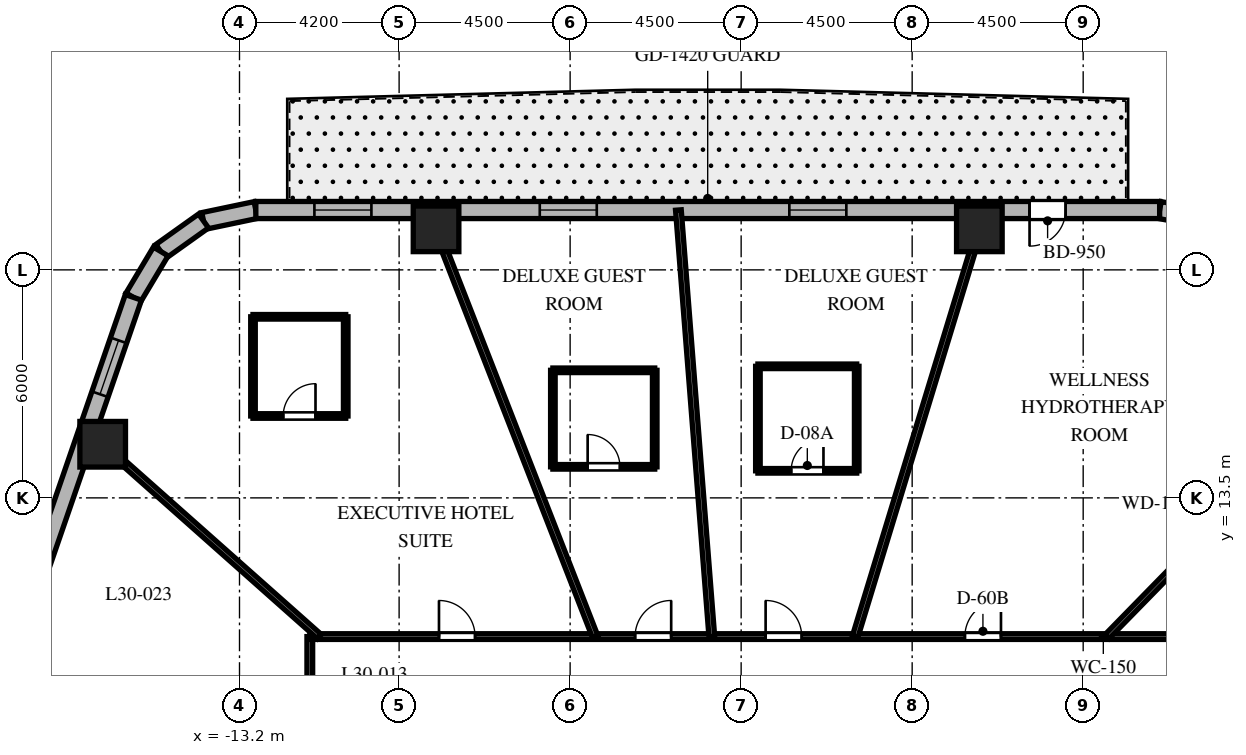
"""IFC4 building model, lengths in metres.
Left out: names, types, materials, properties, quantities, classifications, styles, units other than length and angle.
Written with IfcOpenShell. Run it as: python <this file> out.ifc"""

import sys

from ifc_helpers import new_model, si_unit, direction, frame, frame_2d, origin, origin_2d, place, context, subcontext, project, spatial, rectangle, extrude, element, fill, save


model = new_model("IFC4")
c1 = context("Model", 3, precision=1e-05, world=origin(), true_north=direction((0.0, 1.0)))
c2 = subcontext(c1, "Body", "Model", "MODEL_VIEW")
j1 = project(units=[si_unit("LENGTHUNIT", "METRE"), si_unit("PLANEANGLEUNIT", "RADIAN")], contexts=[c1])
p1 = place(None, origin())
s1 = spatial("IfcSite", under=j1, at=p1, CompositionType="ELEMENT")
p2 = place(p1, origin())
s2 = spatial("IfcBuilding", under=s1, at=p2, CompositionType="ELEMENT")
p3 = place(p2, frame((0.0, 0.0, 124.7)))
s3 = spatial("IfcBuildingStorey", under=s2, at=p3, CompositionType="ELEMENT", Elevation=124.7)
for number, where, z_axis, x_axis in (
    (1, (6.268, 20.58, 0.0), (0.0, 0.0, 1.0), (1.0, 0.0, 0.0)),
    (2, (-8.028, 20.58, 0.0), (0.0, 0.0, 1.0), (1.0, 0.0, 0.0)),
    (3, (-16.8, 14.911, 0.0), (0.0, 0.0, 1.0), (1.0, 0.0, 0.0)),
):
    element("IfcColumn", number, at=place(p3, frame(where, z_axis=z_axis, x_axis=x_axis)), inside=s3, PredefinedType="COLUMN", context=c2, shape_type="SweptSolid", body=[
        extrude(rectangle(XDim=1.2, YDim=1.2, at=origin_2d()), origin(), (0.0, 0.0, 1.0), 3.7),
    ])
p4 = place(p3, frame((12.259, 20.84, 0.0), z_axis=(0.0, 0.0, 1.0), x_axis=(-0.982730354425, 0.185043374624, 0.0)))
e4 = element("IfcWall", 4, at=p4, inside=s3, PredefinedType="SOLIDWALL", context=c2, shape_type="SweptSolid", body=[
    extrude(rectangle(XDim=1.269, YDim=0.45, at=frame_2d((0.635, 0.0))), origin(), (0.0, 0.0, 1.0), 3.4),
])
p5 = place(p3, frame((-12.771, 21.075, 0.0), z_axis=(0.0, 0.0, 1.0), x_axis=(-0.97874281988, -0.205091424819, 0.0)))
e5 = element("IfcWall", 5, at=p5, inside=s3, PredefinedType="SOLIDWALL", context=c2, shape_type="SweptSolid", body=[
    extrude(rectangle(XDim=1.406, YDim=0.45, at=frame_2d((0.703, 0.0))), origin(), (0.0, 0.0, 1.0), 3.4),
])
p6 = place(p3, frame((-14.146, 20.787, 0.0), z_axis=(0.0, 0.0, 1.0), x_axis=(-0.814162929117, -0.580636482536, 0.0)))
e6 = element("IfcWall", 6, at=p6, inside=s3, PredefinedType="SOLIDWALL", context=c2, shape_type="SweptSolid", body=[
    extrude(rectangle(XDim=1.382, YDim=0.45, at=frame_2d((0.691, 0.0))), origin(), (0.0, 0.0, 1.0), 3.4),
])
p7 = place(p3, frame((-15.272, 19.984, 0.0), z_axis=(0.0, 0.0, 1.0), x_axis=(-0.512579347361, -0.858639862025, 0.0)))
e7 = element("IfcWall", 7, at=p7, inside=s3, PredefinedType="SOLIDWALL", context=c2, shape_type="SweptSolid", body=[
    extrude(rectangle(XDim=1.406, YDim=0.45, at=frame_2d((0.703, 0.0))), origin(), (0.0, 0.0, 1.0), 3.4),
])
p8 = place(p3, frame((11.012, 21.075, 0.0), z_axis=(0.0, 0.0, 1.0), x_axis=(-1.0, 0.0, 0.0)))
e8 = element("IfcWall", 8, at=p8, inside=s3, PredefinedType="SOLIDWALL", context=c2, shape_type="SweptSolid", body=[
    extrude(rectangle(XDim=23.782, YDim=0.45, at=frame_2d((11.891, 0.0))), origin(), (0.0, 0.0, 1.0), 3.4),
])
p9 = place(p8, frame((2.473, 0.0, 0.0)))
e9 = element("IfcOpeningElement", 9, at=p9, cuts=e8, PredefinedType="OPENING", context=c2, shape_type="SweptSolid", body=[
    extrude(rectangle(XDim=0.95, YDim=2.15, at=frame_2d((0.475, 1.075))), frame((0.0, 0.235, 0.0), z_axis=(0.0, -1.0, 0.0), x_axis=(1.0, 0.0, 0.0)), (0.0, 0.0, 1.0), 0.47),
])
p10 = place(p8, frame((8.244, 0.0, 0.8)))
e10 = element("IfcOpeningElement", 10, at=p10, cuts=e8, PredefinedType="OPENING", context=c2, shape_type="SweptSolid", body=[
    extrude(rectangle(XDim=1.5, YDim=1.8, at=frame_2d((0.75, 0.9))), frame((0.0, 0.235, 0.0), z_axis=(0.0, -1.0, 0.0), x_axis=(1.0, 0.0, 0.0)), (0.0, 0.0, 1.0), 0.47),
])
p11 = place(p8, frame((14.811, 0.0, 0.8)))
e11 = element("IfcOpeningElement", 11, at=p11, cuts=e8, PredefinedType="OPENING", context=c2, shape_type="SweptSolid", body=[
    extrude(rectangle(XDim=1.5, YDim=1.8, at=frame_2d((0.75, 0.9))), frame((0.0, 0.235, 0.0), z_axis=(0.0, -1.0, 0.0), x_axis=(1.0, 0.0, 0.0)), (0.0, 0.0, 1.0), 0.47),
])
p12 = place(p8, frame((20.741, 0.0, 0.8)))
e12 = element("IfcOpeningElement", 12, at=p12, cuts=e8, PredefinedType="OPENING", context=c2, shape_type="SweptSolid", body=[
    extrude(rectangle(XDim=1.5, YDim=1.8, at=frame_2d((0.75, 0.9))), frame((0.0, 0.235, 0.0), z_axis=(0.0, -1.0, 0.0), x_axis=(1.0, 0.0, 0.0)), (0.0, 0.0, 1.0), 0.47),
])
p13 = place(p3, frame((-15.992, 18.777, 0.0), z_axis=(0.0, 0.0, 1.0), x_axis=(-0.325606988926, -0.945505202927, 0.0)))
e13 = element("IfcWall", 13, at=p13, inside=s3, PredefinedType="SOLIDWALL", context=c2, shape_type="SweptSolid", body=[
    extrude(rectangle(XDim=19.669, YDim=0.45, at=frame_2d((9.835, 0.0))), origin(), (0.0, 0.0, 1.0), 3.4),
])
p14 = place(p13, frame((1.197, 0.0, 0.8)))
e14 = element("IfcOpeningElement", 14, at=p14, cuts=e13, PredefinedType="OPENING", context=c2, shape_type="SweptSolid", body=[
    extrude(rectangle(XDim=1.5, YDim=1.8, at=frame_2d((0.75, 0.9))), frame((0.0, 0.235, 0.0), z_axis=(0.0, -1.0, 0.0), x_axis=(1.0, 0.0, 0.0)), (0.0, 0.0, 1.0), 0.47),
])
p15 = place(p13, frame((9.03, 0.0, 0.8)))
e15 = element("IfcOpeningElement", 15, at=p15, cuts=e13, PredefinedType="OPENING", context=c2, shape_type="SweptSolid", body=[
    extrude(rectangle(XDim=1.5, YDim=1.8, at=frame_2d((0.75, 0.9))), frame((0.0, 0.235, 0.0), z_axis=(0.0, -1.0, 0.0), x_axis=(1.0, 0.0, 0.0)), (0.0, 0.0, 1.0), 0.47),
])
p16 = place(p13, frame((16.918, 0.0, 0.8)))
e16 = element("IfcOpeningElement", 16, at=p16, cuts=e13, PredefinedType="OPENING", context=c2, shape_type="SweptSolid", body=[
    extrude(rectangle(XDim=1.5, YDim=1.8, at=frame_2d((0.75, 0.9))), frame((0.0, 0.235, 0.0), z_axis=(0.0, -1.0, 0.0), x_axis=(1.0, 0.0, 0.0)), (0.0, 0.0, 1.0), 0.47),
])
p17 = place(p3, frame((-11.35, -9.85, 0.0), z_axis=(0.0, 0.0, 1.0), x_axis=(0.0, 1.0, 0.0)))
e17 = element("IfcWall", 17, at=p17, inside=s3, PredefinedType="PARTITIONING", context=c2, shape_type="SweptSolid", body=[
    extrude(rectangle(XDim=19.7, YDim=0.15, at=frame_2d((9.85, 0.0))), origin(), (0.0, 0.0, 1.0), 2.84),
])
p18 = place(p17, frame((15.205, 0.0, 0.0)))
e18 = element("IfcOpeningElement", 18, at=p18, cuts=e17, PredefinedType="OPENING", context=c2, shape_type="SweptSolid", body=[
    extrude(rectangle(XDim=0.95, YDim=2.03, at=frame_2d((0.475, 1.015))), frame((0.0, 0.085, 0.0), z_axis=(0.0, -1.0, 0.0), x_axis=(1.0, 0.0, 0.0)), (0.0, 0.0, 1.0), 0.17),
])
p19 = place(p17, frame((8.836, 0.0, 0.0)))
e19 = element("IfcOpeningElement", 19, at=p19, cuts=e17, PredefinedType="OPENING", context=c2, shape_type="SweptSolid", body=[
    extrude(rectangle(XDim=0.95, YDim=2.03, at=frame_2d((0.475, 1.015))), frame((0.0, 0.085, 0.0), z_axis=(0.0, -1.0, 0.0), x_axis=(1.0, 0.0, 0.0)), (0.0, 0.0, 1.0), 0.17),
])
p20 = place(p17, frame((3.008, 0.0, 0.0)))
e20 = element("IfcOpeningElement", 20, at=p20, cuts=e17, PredefinedType="OPENING", context=c2, shape_type="SweptSolid", body=[
    extrude(rectangle(XDim=0.95, YDim=2.03, at=frame_2d((0.475, 1.015))), frame((0.0, 0.085, 0.0), z_axis=(0.0, -1.0, 0.0), x_axis=(1.0, 0.0, 0.0)), (0.0, 0.0, 1.0), 0.17),
])
p21 = place(p3, frame((-11.35, 9.85, 0.0), z_axis=(0.0, 0.0, 1.0), x_axis=(1.0, 0.0, 0.0)))
e21 = element("IfcWall", 21, at=p21, inside=s3, PredefinedType="PARTITIONING", context=c2, shape_type="SweptSolid", body=[
    extrude(rectangle(XDim=22.7, YDim=0.15, at=frame_2d((11.35, 0.0))), origin(), (0.0, 0.0, 1.0), 2.84),
])
p22 = place(p21, frame((17.237, 0.0, 0.0)))
e22 = element("IfcOpeningElement", 22, at=p22, cuts=e21, PredefinedType="OPENING", context=c2, shape_type="SweptSolid", body=[
    extrude(rectangle(XDim=0.95, YDim=2.03, at=frame_2d((0.475, 1.015))), frame((0.0, 0.085, 0.0), z_axis=(0.0, -1.0, 0.0), x_axis=(1.0, 0.0, 0.0)), (0.0, 0.0, 1.0), 0.17),
])
p23 = place(p21, frame((11.994, 0.0, 0.0)))
e23 = element("IfcOpeningElement", 23, at=p23, cuts=e21, PredefinedType="OPENING", context=c2, shape_type="SweptSolid", body=[
    extrude(rectangle(XDim=0.95, YDim=2.03, at=frame_2d((0.475, 1.015))), frame((0.0, 0.085, 0.0), z_axis=(0.0, -1.0, 0.0), x_axis=(1.0, 0.0, 0.0)), (0.0, 0.0, 1.0), 0.17),
])
p24 = place(p21, frame((8.559, 0.0, 0.0)))
e24 = element("IfcOpeningElement", 24, at=p24, cuts=e21, PredefinedType="OPENING", context=c2, shape_type="SweptSolid", body=[
    extrude(rectangle(XDim=0.95, YDim=2.03, at=frame_2d((0.475, 1.015))), frame((0.0, 0.085, 0.0), z_axis=(0.0, -1.0, 0.0), x_axis=(1.0, 0.0, 0.0)), (0.0, 0.0, 1.0), 0.17),
])
p25 = place(p21, frame((3.399, 0.0, 0.0)))
e25 = element("IfcOpeningElement", 25, at=p25, cuts=e21, PredefinedType="OPENING", context=c2, shape_type="SweptSolid", body=[
    extrude(rectangle(XDim=0.95, YDim=2.03, at=frame_2d((0.475, 1.015))), frame((0.0, 0.085, 0.0), z_axis=(0.0, -1.0, 0.0), x_axis=(1.0, 0.0, 0.0)), (0.0, 0.0, 1.0), 0.17),
])
p26 = place(p3, frame((9.628, 9.85, 0.0), z_axis=(0.0, 0.0, 1.0), x_axis=(0.698992824326, 0.715128681805, 0.0)))
e26 = element("IfcWall", 26, at=p26, inside=s3, PredefinedType="PARTITIONING", context=c2, shape_type="SweptSolid", body=[
    extrude(rectangle(XDim=8.579, YDim=0.15, at=frame_2d((4.29, 0.0))), origin(), (0.0, 0.0, 1.0), 2.54),
])
p27 = place(p3, frame((3.0, 9.85, 0.0), z_axis=(0.0, 0.0, 1.0), x_axis=(0.291352035382, 0.95661590593, 0.0)))
e27 = element("IfcWall", 27, at=p27, inside=s3, PredefinedType="PARTITIONING", context=c2, shape_type="SweptSolid", body=[
    extrude(rectangle(XDim=11.734, YDim=0.15, at=frame_2d((5.867, 0.0))), origin(), (0.0, 0.0, 1.0), 2.54),
])
p28 = place(p3, frame((-0.772, 9.85, 0.0), z_axis=(0.0, 0.0, 1.0), x_axis=(-0.078125747145, 0.996943512759, 0.0)))
e28 = element("IfcWall", 28, at=p28, inside=s3, PredefinedType="PARTITIONING", context=c2, shape_type="SweptSolid", body=[
    extrude(rectangle(XDim=11.259, YDim=0.15, at=frame_2d((5.63, 0.0))), origin(), (0.0, 0.0, 1.0), 2.54),
])
p29 = place(p3, frame((-3.842, 9.85, 0.0), z_axis=(0.0, 0.0, 1.0), x_axis=(-0.363432685593, 0.931620460833, 0.0)))
e29 = element("IfcWall", 29, at=p29, inside=s3, PredefinedType="PARTITIONING", context=c2, shape_type="SweptSolid", body=[
    extrude(rectangle(XDim=12.049, YDim=0.15, at=frame_2d((6.024, 0.0))), origin(), (0.0, 0.0, 1.0), 2.54),
])
p30 = place(p3, frame((-11.098, 9.85, 0.0), z_axis=(0.0, 0.0, 1.0), x_axis=(-0.747904295103, 0.663806572253, 0.0)))
e30 = element("IfcWall", 30, at=p30, inside=s3, PredefinedType="PARTITIONING", context=c2, shape_type="SweptSolid", body=[
    extrude(rectangle(XDim=8.16, YDim=0.15, at=frame_2d((4.08, 0.0))), origin(), (0.0, 0.0, 1.0), 2.54),
])
p31 = place(p3, frame((0.441, 14.212, 0.0), z_axis=(0.0, 0.0, 1.0), x_axis=(1.0, 0.0, 0.0)))
e31 = element("IfcWall", 31, at=p31, inside=s3, PredefinedType="PARTITIONING", context=c2, shape_type="SweptSolid", body=[
    extrude(rectangle(XDim=2.6, YDim=0.12, at=frame_2d((1.3, 0.0))), origin(), (0.0, 0.0, 1.0), 3.4),
])
p32 = place(p31, frame((0.875, 0.0, 0.0)))
e32 = element("IfcOpeningElement", 32, at=p32, cuts=e31, PredefinedType="OPENING", context=c2, shape_type="SweptSolid", body=[
    extrude(rectangle(XDim=0.85, YDim=2.03, at=frame_2d((0.425, 1.015))), frame((0.0, 0.07, 0.0), z_axis=(0.0, -1.0, 0.0), x_axis=(1.0, 0.0, 0.0)), (0.0, 0.0, 1.0), 0.14),
])
p33 = place(p3, frame((3.041, 14.212, 0.0), z_axis=(0.0, 0.0, 1.0), x_axis=(0.0, 1.0, 0.0)))
e33 = element("IfcWall", 33, at=p33, inside=s3, PredefinedType="PARTITIONING", context=c2, shape_type="SweptSolid", body=[
    extrude(rectangle(XDim=2.75, YDim=0.12, at=frame_2d((1.375, 0.0))), origin(), (0.0, 0.0, 1.0), 2.84),
])
p34 = place(p3, frame((3.041, 16.962, 0.0), z_axis=(0.0, 0.0, 1.0), x_axis=(-1.0, 0.0, 0.0)))
e34 = element("IfcWall", 34, at=p34, inside=s3, PredefinedType="PARTITIONING", context=c2, shape_type="SweptSolid", body=[
    extrude(rectangle(XDim=2.6, YDim=0.12, at=frame_2d((1.3, 0.0))), origin(), (0.0, 0.0, 1.0), 3.4),
])
p35 = place(p3, frame((0.441, 16.962, 0.0), z_axis=(0.0, 0.0, 1.0), x_axis=(0.0, -1.0, 0.0)))
e35 = element("IfcWall", 35, at=p35, inside=s3, PredefinedType="PARTITIONING", context=c2, shape_type="SweptSolid", body=[
    extrude(rectangle(XDim=2.75, YDim=0.12, at=frame_2d((1.375, 0.0))), origin(), (0.0, 0.0, 1.0), 2.84),
])
p36 = place(p3, frame((-4.954, 14.317, 0.0), z_axis=(0.0, 0.0, 1.0), x_axis=(1.0, 0.0, 0.0)))
e36 = element("IfcWall", 36, at=p36, inside=s3, PredefinedType="PARTITIONING", context=c2, shape_type="SweptSolid", body=[
    extrude(rectangle(XDim=2.68, YDim=0.12, at=frame_2d((1.34, 0.0))), origin(), (0.0, 0.0, 1.0), 3.4),
])
p37 = place(p36, frame((0.915, 0.0, 0.0)))
e37 = element("IfcOpeningElement", 37, at=p37, cuts=e36, PredefinedType="OPENING", context=c2, shape_type="SweptSolid", body=[
    extrude(rectangle(XDim=0.85, YDim=2.03, at=frame_2d((0.425, 1.015))), frame((0.0, 0.07, 0.0), z_axis=(0.0, -1.0, 0.0), x_axis=(1.0, 0.0, 0.0)), (0.0, 0.0, 1.0), 0.14),
])
p38 = place(p3, frame((-2.274, 14.317, 0.0), z_axis=(0.0, 0.0, 1.0), x_axis=(0.0, 1.0, 0.0)))
e38 = element("IfcWall", 38, at=p38, inside=s3, PredefinedType="PARTITIONING", context=c2, shape_type="SweptSolid", body=[
    extrude(rectangle(XDim=2.54, YDim=0.12, at=frame_2d((1.27, 0.0))), origin(), (0.0, 0.0, 1.0), 2.84),
])
p39 = place(p3, frame((-2.274, 16.857, 0.0), z_axis=(0.0, 0.0, 1.0), x_axis=(-1.0, 0.0, 0.0)))
e39 = element("IfcWall", 39, at=p39, inside=s3, PredefinedType="PARTITIONING", context=c2, shape_type="SweptSolid", body=[
    extrude(rectangle(XDim=2.68, YDim=0.12, at=frame_2d((1.34, 0.0))), origin(), (0.0, 0.0, 1.0), 3.4),
])
p40 = place(p3, frame((-4.954, 16.857, 0.0), z_axis=(0.0, 0.0, 1.0), x_axis=(0.0, -1.0, 0.0)))
e40 = element("IfcWall", 40, at=p40, inside=s3, PredefinedType="PARTITIONING", context=c2, shape_type="SweptSolid", body=[
    extrude(rectangle(XDim=2.54, YDim=0.12, at=frame_2d((1.27, 0.0))), origin(), (0.0, 0.0, 1.0), 2.84),
])
p41 = place(p3, frame((-12.845, 15.655, 0.0), z_axis=(0.0, 0.0, 1.0), x_axis=(1.0, 0.0, 0.0)))
e41 = element("IfcWall", 41, at=p41, inside=s3, PredefinedType="PARTITIONING", context=c2, shape_type="SweptSolid", body=[
    extrude(rectangle(XDim=2.44, YDim=0.12, at=frame_2d((1.22, 0.0))), origin(), (0.0, 0.0, 1.0), 3.4),
])
p42 = place(p41, frame((0.795, 0.0, 0.0)))
e42 = element("IfcOpeningElement", 42, at=p42, cuts=e41, PredefinedType="OPENING", context=c2, shape_type="SweptSolid", body=[
    extrude(rectangle(XDim=0.85, YDim=2.03, at=frame_2d((0.425, 1.015))), frame((0.0, 0.07, 0.0), z_axis=(0.0, -1.0, 0.0), x_axis=(1.0, 0.0, 0.0)), (0.0, 0.0, 1.0), 0.14),
])
p43 = place(p3, frame((-10.405, 15.655, 0.0), z_axis=(0.0, 0.0, 1.0), x_axis=(0.0, 1.0, 0.0)))
e43 = element("IfcWall", 43, at=p43, inside=s3, PredefinedType="PARTITIONING", context=c2, shape_type="SweptSolid", body=[
    extrude(rectangle(XDim=2.61, YDim=0.12, at=frame_2d((1.305, 0.0))), origin(), (0.0, 0.0, 1.0), 3.4),
])
p44 = place(p3, frame((-10.405, 18.265, 0.0), z_axis=(0.0, 0.0, 1.0), x_axis=(-1.0, 0.0, 0.0)))
e44 = element("IfcWall", 44, at=p44, inside=s3, PredefinedType="PARTITIONING", context=c2, shape_type="SweptSolid", body=[
    extrude(rectangle(XDim=2.44, YDim=0.12, at=frame_2d((1.22, 0.0))), origin(), (0.0, 0.0, 1.0), 2.54),
])
p45 = place(p3, frame((-12.845, 18.265, 0.0), z_axis=(0.0, 0.0, 1.0), x_axis=(0.0, -1.0, 0.0)))
e45 = element("IfcWall", 45, at=p45, inside=s3, PredefinedType="PARTITIONING", context=c2, shape_type="SweptSolid", body=[
    extrude(rectangle(XDim=2.61, YDim=0.12, at=frame_2d((1.305, 0.0))), origin(), (0.0, 0.0, 1.0), 2.54),
])
p46 = place(p9, origin())
e46 = element("IfcDoor", 46, at=p46, inside=s3, OperationType="SINGLE_SWING_RIGHT", PredefinedType="DOOR", context=c2, shape_type="SweptSolid", body=[
    extrude(rectangle(XDim=0.95, YDim=2.15, at=frame_2d((0.475, 1.075))), frame((0.0, 0.025, 0.0), z_axis=(0.0, -1.0, 0.0), x_axis=(1.0, 0.0, 0.0)), (0.0, 0.0, 1.0), 0.05),
])
fill(e9, e46)
p47 = place(p10, origin())
e47 = element("IfcWindow", 47, at=p47, inside=s3, PartitioningType="SINGLE_PANEL", PredefinedType="WINDOW", context=c2, shape_type="SweptSolid", body=[
    extrude(rectangle(XDim=1.5, YDim=1.8, at=frame_2d((0.75, 0.9))), frame((0.0, 0.03, 0.0), z_axis=(0.0, -1.0, 0.0), x_axis=(1.0, 0.0, 0.0)), (0.0, 0.0, 1.0), 0.06),
])
fill(e10, e47)
p48 = place(p11, origin())
e48 = element("IfcWindow", 48, at=p48, inside=s3, PartitioningType="SINGLE_PANEL", PredefinedType="WINDOW", context=c2, shape_type="SweptSolid", body=[
    extrude(rectangle(XDim=1.5, YDim=1.8, at=frame_2d((0.75, 0.9))), frame((0.0, 0.03, 0.0), z_axis=(0.0, -1.0, 0.0), x_axis=(1.0, 0.0, 0.0)), (0.0, 0.0, 1.0), 0.06),
])
fill(e11, e48)
p49 = place(p12, origin())
e49 = element("IfcWindow", 49, at=p49, inside=s3, PartitioningType="SINGLE_PANEL", PredefinedType="WINDOW", context=c2, shape_type="SweptSolid", body=[
    extrude(rectangle(XDim=1.5, YDim=1.8, at=frame_2d((0.75, 0.9))), frame((0.0, 0.03, 0.0), z_axis=(0.0, -1.0, 0.0), x_axis=(1.0, 0.0, 0.0)), (0.0, 0.0, 1.0), 0.06),
])
fill(e12, e49)
p50 = place(p14, origin())
e50 = element("IfcWindow", 50, at=p50, inside=s3, PartitioningType="SINGLE_PANEL", PredefinedType="WINDOW", context=c2, shape_type="SweptSolid", body=[
    extrude(rectangle(XDim=1.5, YDim=1.8, at=frame_2d((0.75, 0.9))), frame((0.0, 0.03, 0.0), z_axis=(0.0, -1.0, 0.0), x_axis=(1.0, 0.0, 0.0)), (0.0, 0.0, 1.0), 0.06),
])
fill(e14, e50)
p51 = place(p22, origin())
e51 = element("IfcDoor", 51, at=p51, inside=s3, OperationType="SINGLE_SWING_RIGHT", PredefinedType="DOOR", context=c2, shape_type="SweptSolid", body=[
    extrude(rectangle(XDim=0.95, YDim=2.03, at=frame_2d((0.475, 1.015))), frame((0.0, 0.025, 0.0), z_axis=(0.0, -1.0, 0.0), x_axis=(1.0, 0.0, 0.0)), (0.0, 0.0, 1.0), 0.05),
])
fill(e22, e51)
p52 = place(p23, origin())
e52 = element("IfcDoor", 52, at=p52, inside=s3, OperationType="SINGLE_SWING_LEFT", PredefinedType="DOOR", context=c2, shape_type="SweptSolid", body=[
    extrude(rectangle(XDim=0.95, YDim=2.03, at=frame_2d((0.475, 1.015))), frame((0.0, 0.025, 0.0), z_axis=(0.0, -1.0, 0.0), x_axis=(1.0, 0.0, 0.0)), (0.0, 0.0, 1.0), 0.05),
])
fill(e23, e52)
p53 = place(p32, origin())
e53 = element("IfcDoor", 53, at=p53, inside=s3, OperationType="SINGLE_SWING_RIGHT", PredefinedType="DOOR", context=c2, shape_type="SweptSolid", body=[
    extrude(rectangle(XDim=0.85, YDim=2.03, at=frame_2d((0.425, 1.015))), frame((0.0, 0.025, 0.0), z_axis=(0.0, -1.0, 0.0), x_axis=(1.0, 0.0, 0.0)), (0.0, 0.0, 1.0), 0.05),
])
fill(e32, e53)
p54 = place(p24, origin())
e54 = element("IfcDoor", 54, at=p54, inside=s3, OperationType="SINGLE_SWING_RIGHT", PredefinedType="DOOR", context=c2, shape_type="SweptSolid", body=[
    extrude(rectangle(XDim=0.95, YDim=2.03, at=frame_2d((0.475, 1.015))), frame((0.0, 0.025, 0.0), z_axis=(0.0, -1.0, 0.0), x_axis=(1.0, 0.0, 0.0)), (0.0, 0.0, 1.0), 0.05),
])
fill(e24, e54)
p55 = place(p37, origin())
e55 = element("IfcDoor", 55, at=p55, inside=s3, OperationType="SINGLE_SWING_LEFT", PredefinedType="DOOR", context=c2, shape_type="SweptSolid", body=[
    extrude(rectangle(XDim=0.85, YDim=2.03, at=frame_2d((0.425, 1.015))), frame((0.0, 0.025, 0.0), z_axis=(0.0, -1.0, 0.0), x_axis=(1.0, 0.0, 0.0)), (0.0, 0.0, 1.0), 0.05),
])
fill(e37, e55)
p56 = place(p25, origin())
e56 = element("IfcDoor", 56, at=p56, inside=s3, OperationType="SINGLE_SWING_LEFT", PredefinedType="DOOR", context=c2, shape_type="SweptSolid", body=[
    extrude(rectangle(XDim=0.95, YDim=2.03, at=frame_2d((0.475, 1.015))), frame((0.0, 0.025, 0.0), z_axis=(0.0, -1.0, 0.0), x_axis=(1.0, 0.0, 0.0)), (0.0, 0.0, 1.0), 0.05),
])
fill(e25, e56)
p57 = place(p42, origin())
e57 = element("IfcDoor", 57, at=p57, inside=s3, OperationType="SINGLE_SWING_RIGHT", PredefinedType="DOOR", context=c2, shape_type="SweptSolid", body=[
    extrude(rectangle(XDim=0.85, YDim=2.03, at=frame_2d((0.425, 1.015))), frame((0.0, 0.025, 0.0), z_axis=(0.0, -1.0, 0.0), x_axis=(1.0, 0.0, 0.0)), (0.0, 0.0, 1.0), 0.05),
])
fill(e42, e57)
save(model, sys.argv[1])
